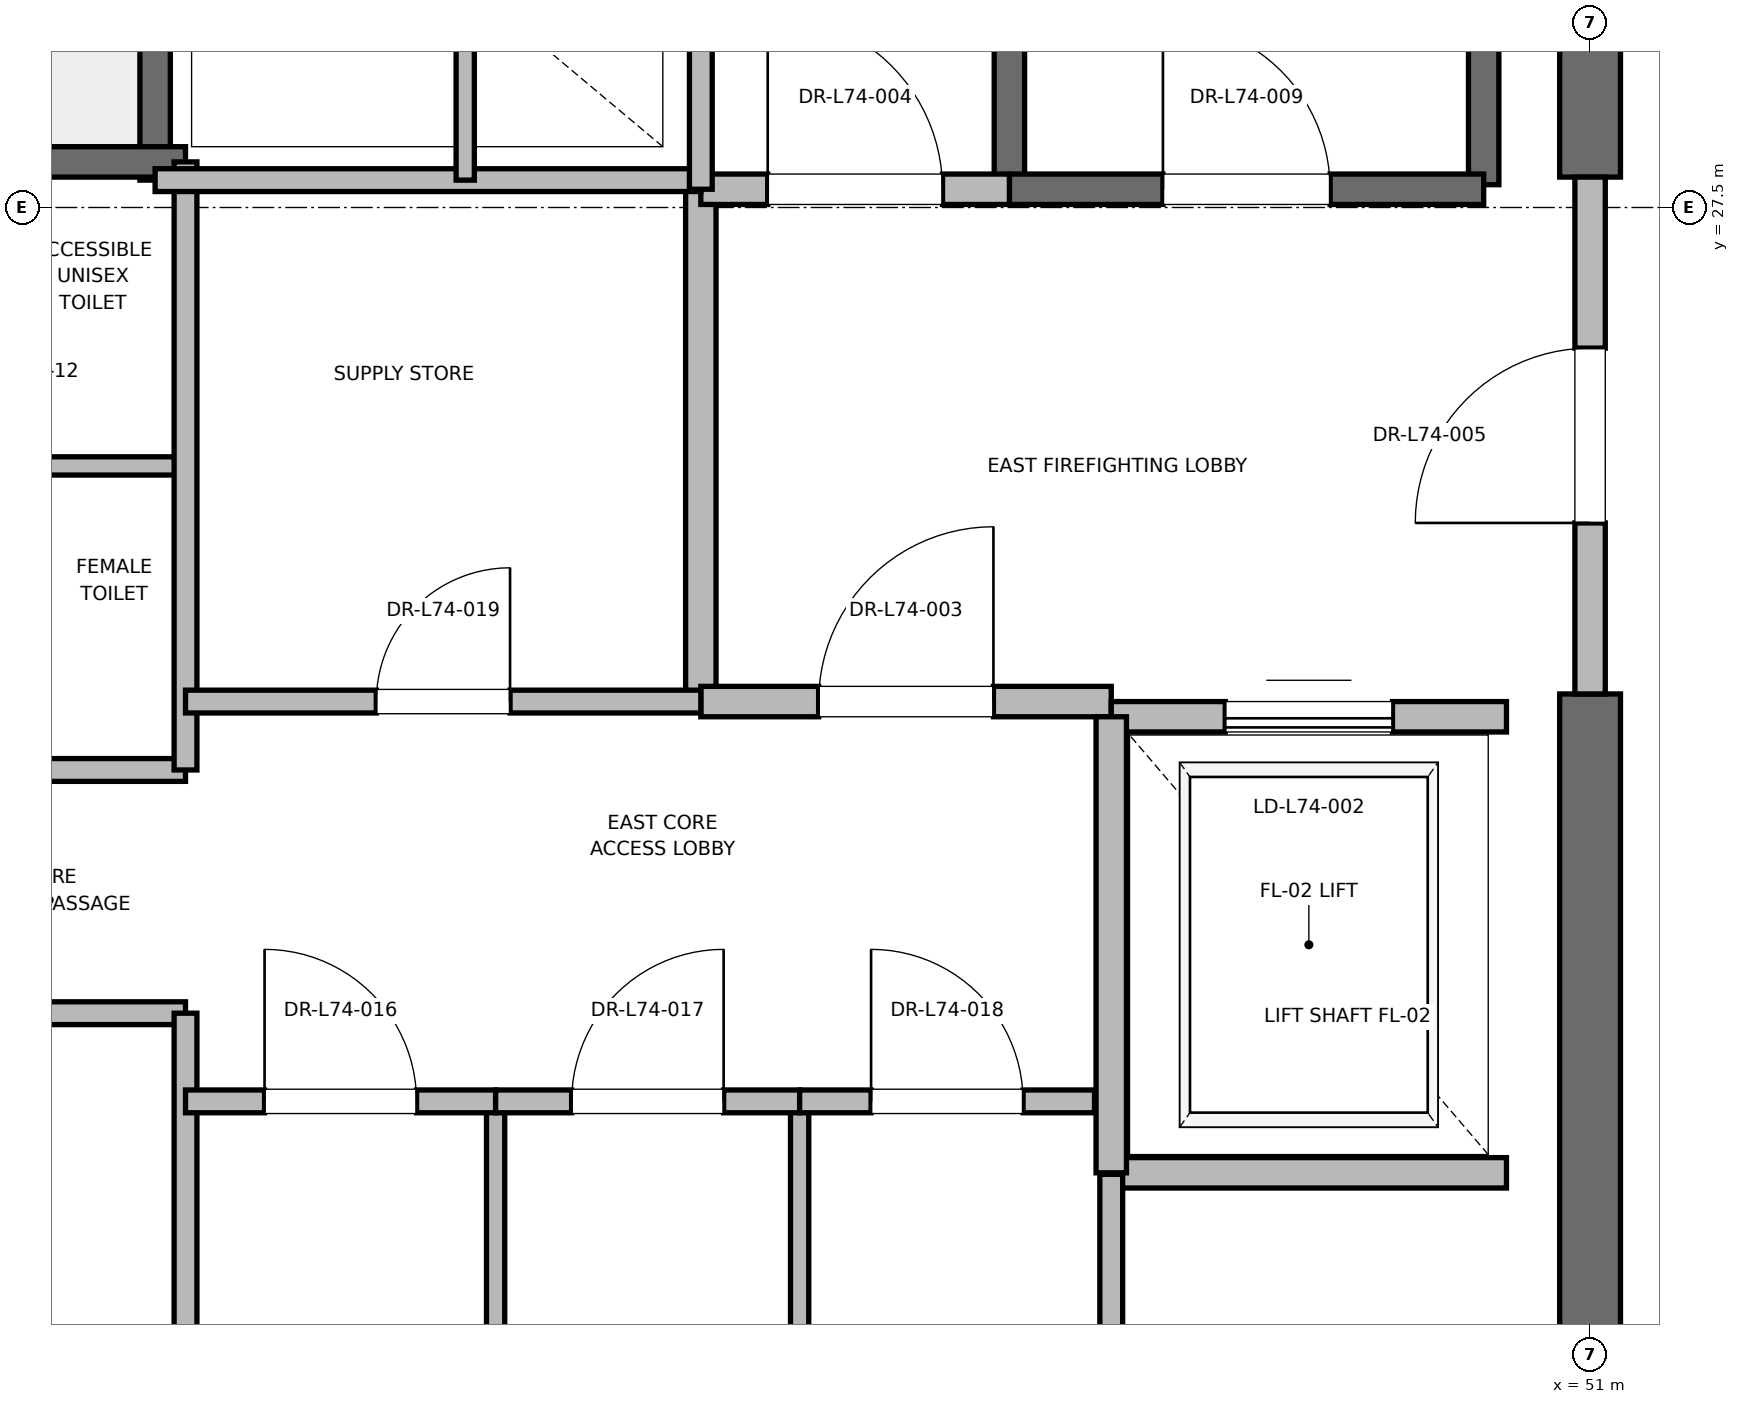
"""IFC4 building model, lengths in metres.
Left out: names, types, materials, properties, quantities, classifications, styles, units other than length and angle.
Written with IfcOpenShell. Run it as: python <this file> out.ifc"""

import sys

from ifc_helpers import new_model, si_unit, direction, frame, frame_2d, origin, place, context, subcontext, project, spatial, rectangle, extrude, element, fill, save


model = new_model("IFC4")
c1 = context("Model", 3, precision=1e-05, world=origin(), true_north=direction((0.0, 1.0)))
c2 = subcontext(c1, "Body", "Model", "MODEL_VIEW")
j1 = project(units=[si_unit("LENGTHUNIT", "METRE"), si_unit("PLANEANGLEUNIT", "RADIAN")], contexts=[c1])
p1 = place(None, origin())
s1 = spatial("IfcSite", under=j1, at=p1, CompositionType="ELEMENT")
p2 = place(p1, origin())
s2 = spatial("IfcBuilding", under=s1, at=p2, CompositionType="ELEMENT")
p3 = place(p2, frame((0.0, 0.0, 318.8)))
s3 = spatial("IfcBuildingStorey", under=s2, at=p3, CompositionType="ELEMENT", Elevation=318.8)
p4 = place(p3, frame((51.0, 18.5, 0.0), z_axis=(0.0, 0.0, 1.0), x_axis=(0.0, 1.0, 0.0)))
e1 = element("IfcWall", 1, at=p4, inside=s3, PredefinedType="SHEAR", context=c2, shape_type="SweptSolid", body=[
    extrude(rectangle(XDim=5.8, YDim=0.4, at=frame_2d((2.9, 0.0))), origin(), (0.0, 0.0, 1.0), 3.785),
])
p5 = place(p3, frame((51.0, 27.7, 0.0), z_axis=(0.0, 0.0, 1.0), x_axis=(0.0, 1.0, 0.0)))
e2 = element("IfcWall", 2, at=p5, inside=s3, PredefinedType="SHEAR", context=c2, shape_type="SweptSolid", body=[
    extrude(rectangle(XDim=8.8, YDim=0.4, at=frame_2d((4.4, 0.0))), origin(), (0.0, 0.0, 1.0), 3.785),
])
p6 = place(p3, frame((50.3, 27.65, 0.0), z_axis=(0.0, 0.0, 1.0), x_axis=(0.0, 1.0, 0.0)))
e3 = element("IfcWall", 3, at=p6, inside=s3, PredefinedType="SOLIDWALL", context=c2, shape_type="SweptSolid", body=[
    extrude(rectangle(XDim=8.15, YDim=0.2, at=frame_2d((4.075, 0.0))), origin(), (0.0, 0.0, 1.0), 3.785),
])
p7 = place(p3, frame((47.18, 27.62, 0.0), z_axis=(0.0, 0.0, 1.0), x_axis=(0.0, 1.0, 0.0)))
e4 = element("IfcWall", 4, at=p7, inside=s3, PredefinedType="SOLIDWALL", context=c2, shape_type="SweptSolid", body=[
    extrude(rectangle(XDim=8.18, YDim=0.2, at=frame_2d((4.09, 0.0))), origin(), (0.0, 0.0, 1.0), 3.785),
])
p8 = place(p3, frame((47.18, 27.62, 0.0), z_axis=(0.0, 0.0, 1.0), x_axis=(1.0, 0.0, 0.0)))
e5 = element("IfcWall", 5, at=p8, inside=s3, PredefinedType="SOLIDWALL", context=c2, shape_type="SweptSolid", body=[
    extrude(rectangle(XDim=3.12, YDim=0.2, at=frame_2d((1.56, 0.0))), origin(), (0.0, 0.0, 1.0), 3.785),
])
p9 = place(p8, frame((1.01, 0.0, 0.0)))
e6 = element("IfcOpeningElement", 6, at=p9, cuts=e5, PredefinedType="OPENING", context=c2, shape_type="SweptSolid", body=[
    extrude(rectangle(XDim=1.1, YDim=2.15, at=frame_2d((0.55, 1.075))), frame((0.0, 0.1, 0.0), z_axis=(0.0, -1.0, 0.0), x_axis=(1.0, 0.0, 0.0)), (0.0, 0.0, 1.0), 0.2),
])
p10 = place(p3, frame((41.56, 27.68, 0.0), z_axis=(0.0, 0.0, 1.0), x_axis=(0.0, 1.0, 0.0)))
e7 = element("IfcWall", 7, at=p10, inside=s3, PredefinedType="SOLIDWALL", context=c2, shape_type="SweptSolid", body=[
    extrude(rectangle(XDim=8.57, YDim=0.2, at=frame_2d((4.285, 0.0))), origin(), (0.0, 0.0, 1.0), 3.785),
])
p11 = place(p3, frame((38.44, 27.8, 0.0), z_axis=(0.0, 0.0, 1.0), x_axis=(1.0, 0.0, 0.0)))
e8 = element("IfcWall", 8, at=p11, inside=s3, PredefinedType="SOLIDWALL", context=c2, shape_type="SweptSolid", body=[
    extrude(rectangle(XDim=3.32, YDim=0.2, at=frame_2d((1.66, 0.0))), origin(), (0.0, 0.0, 1.0), 3.785),
])
p12 = place(p3, frame((45.15, 24.25, 0.0), z_axis=(0.0, 0.0, 1.0), x_axis=(0.0, 1.0, 0.0)))
e9 = element("IfcWall", 9, at=p12, inside=s3, PredefinedType="PARTITIONING", context=c2, shape_type="SweptSolid", body=[
    extrude(rectangle(XDim=3.37, YDim=0.2, at=frame_2d((1.685, 0.0))), origin(), (0.0, 0.0, 1.0), 3.785),
])
p13 = place(p3, frame((45.15, 24.25, 0.0), z_axis=(0.0, 0.0, 1.0), x_axis=(1.0, 0.0, 0.0)))
e10 = element("IfcWall", 10, at=p13, inside=s3, PredefinedType="PARTITIONING", context=c2, shape_type="SweptSolid", body=[
    extrude(rectangle(XDim=2.7, YDim=0.2, at=frame_2d((1.35, 0.0))), origin(), (0.0, 0.0, 1.0), 3.785),
])
p14 = place(p13, frame((0.775, 0.0, 0.0)))
e11 = element("IfcOpeningElement", 11, at=p14, cuts=e10, PredefinedType="OPENING", context=c2, shape_type="SweptSolid", body=[
    extrude(rectangle(XDim=1.15, YDim=2.2, at=frame_2d((0.575, 1.1))), frame((0.0, 0.1, 0.0), z_axis=(0.0, -1.0, 0.0), x_axis=(1.0, 0.0, 0.0)), (0.0, 0.0, 1.0), 0.2),
])
p15 = place(p3, frame((45.15, 27.62, 0.0), z_axis=(0.0, 0.0, 1.0), x_axis=(1.0, 0.0, 0.0)))
e12 = element("IfcWall", 12, at=p15, inside=s3, PredefinedType="PARTITIONING", context=c2, shape_type="SweptSolid", body=[
    extrude(rectangle(XDim=2.03, YDim=0.2, at=frame_2d((1.015, 0.0))), origin(), (0.0, 0.0, 1.0), 3.785),
])
p16 = place(p15, frame((0.44, 0.0, 0.0)))
e13 = element("IfcOpeningElement", 13, at=p16, cuts=e12, PredefinedType="OPENING", context=c2, shape_type="SweptSolid", body=[
    extrude(rectangle(XDim=1.15, YDim=2.2, at=frame_2d((0.575, 1.1))), frame((0.0, 0.1, 0.0), z_axis=(0.0, -1.0, 0.0), x_axis=(1.0, 0.0, 0.0)), (0.0, 0.0, 1.0), 0.2),
])
p17 = place(p3, frame((51.0, 24.3, 0.0), z_axis=(0.0, 0.0, 1.0), x_axis=(0.0, 1.0, 0.0)))
e14 = element("IfcWall", 14, at=p17, inside=s3, PredefinedType="PARTITIONING", context=c2, shape_type="SweptSolid", body=[
    extrude(rectangle(XDim=3.4, YDim=0.2, at=frame_2d((1.7, 0.0))), origin(), (0.0, 0.0, 1.0), 2.865),
])
p18 = place(p17, frame((1.125, 0.0, 0.0)))
e15 = element("IfcOpeningElement", 15, at=p18, cuts=e14, PredefinedType="OPENING", context=c2, shape_type="SweptSolid", body=[
    extrude(rectangle(XDim=1.15, YDim=2.2, at=frame_2d((0.575, 1.1))), frame((0.0, 0.1, 0.0), z_axis=(0.0, -1.0, 0.0), x_axis=(1.0, 0.0, 0.0)), (0.0, 0.0, 1.0), 0.2),
])
p19 = place(p3, frame((47.85, 21.15, 0.0), z_axis=(0.0, 0.0, 1.0), x_axis=(1.0, 0.0, 0.0)))
e16 = element("IfcWall", 16, at=p19, inside=s3, PredefinedType="SOLIDWALL", context=c2, shape_type="SweptSolid", body=[
    extrude(rectangle(XDim=2.6, YDim=0.2, at=frame_2d((1.3, 0.0))), origin(), (0.0, 0.0, 1.0), 3.785),
])
p20 = place(p3, frame((50.45, 24.15, 0.0), z_axis=(0.0, 0.0, 1.0), x_axis=(-1.0, 0.0, 0.0)))
e17 = element("IfcWall", 17, at=p20, inside=s3, PredefinedType="SOLIDWALL", context=c2, shape_type="SweptSolid", body=[
    extrude(rectangle(XDim=2.6, YDim=0.2, at=frame_2d((1.3, 0.0))), origin(), (0.0, 0.0, 1.0), 2.865),
])
p21 = place(p20, frame((0.75, 0.0, 0.0)))
e18 = element("IfcOpeningElement", 18, at=p21, cuts=e17, PredefinedType="OPENING", context=c2, shape_type="SweptSolid", body=[
    extrude(rectangle(XDim=1.1, YDim=2.2, at=frame_2d((0.55, 1.1))), frame((0.0, 0.1, 0.0), z_axis=(0.0, -1.0, 0.0), x_axis=(1.0, 0.0, 0.0)), (0.0, 0.0, 1.0), 0.2),
])
p22 = place(p3, frame((47.85, 24.15, 0.0), z_axis=(0.0, 0.0, 1.0), x_axis=(0.0, -1.0, 0.0)))
e19 = element("IfcWall", 19, at=p22, inside=s3, PredefinedType="SOLIDWALL", context=c2, shape_type="SweptSolid", body=[
    extrude(rectangle(XDim=3.0, YDim=0.2, at=frame_2d((1.5, 0.0))), origin(), (0.0, 0.0, 1.0), 3.785),
])
for number, where, z_axis, x_axis in (
    (20, (39.95, 22.2, 0.0), (0.0, 0.0, 1.0), (1.0, 0.0, 0.0)),
    (21, (39.95, 23.8, 0.0), (0.0, 0.0, 1.0), (1.0, 0.0, 0.0)),
):
    element("IfcWall", number, at=place(p3, frame(where, z_axis=z_axis, x_axis=x_axis)), inside=s3, PredefinedType="PARTITIONING", context=c2, shape_type="SweptSolid", body=[
        extrude(rectangle(XDim=1.81, YDim=0.15, at=frame_2d((0.905, 0.0))), origin(), (0.0, 0.0, 1.0), 2.85),
    ])
p23 = place(p3, frame((39.95, 25.8, 0.0), z_axis=(0.0, 0.0, 1.0), x_axis=(1.0, 0.0, 0.0)))
e22 = element("IfcWall", 22, at=p23, inside=s3, PredefinedType="PARTITIONING", context=c2, shape_type="SweptSolid", body=[
    extrude(rectangle(XDim=1.81, YDim=0.12, at=frame_2d((0.905, 0.0))), origin(), (0.0, 0.0, 1.0), 2.85),
])
p24 = place(p3, frame((41.76, 18.6, 0.0), z_axis=(0.0, 0.0, 1.0), x_axis=(0.0, 1.0, 0.0)))
e23 = element("IfcWall", 23, at=p24, inside=s3, PredefinedType="PARTITIONING", context=c2, shape_type="SweptSolid", body=[
    extrude(rectangle(XDim=3.6, YDim=0.15, at=frame_2d((1.8, 0.0))), origin(), (0.0, 0.0, 1.0), 2.85),
])
p25 = place(p3, frame((41.76, 23.8, 0.0), z_axis=(0.0, 0.0, 1.0), x_axis=(0.0, 1.0, 0.0)))
e24 = element("IfcWall", 24, at=p25, inside=s3, PredefinedType="PARTITIONING", context=c2, shape_type="SweptSolid", body=[
    extrude(rectangle(XDim=4.0, YDim=0.15, at=frame_2d((2.0, 0.0))), origin(), (0.0, 0.0, 1.0), 2.85),
])
p26 = place(p3, frame((41.56, 27.68, 0.0), z_axis=(0.0, 0.0, 1.0), x_axis=(1.0, 0.0, 0.0)))
e25 = element("IfcWall", 25, at=p26, inside=s3, PredefinedType="PARTITIONING", context=c2, shape_type="SweptSolid", body=[
    extrude(rectangle(XDim=3.59, YDim=0.15, at=frame_2d((1.795, 0.0))), origin(), (0.0, 0.0, 1.0), 2.85),
])
p27 = place(p3, frame((47.85, 18.6, 0.0), z_axis=(0.0, 0.0, 1.0), x_axis=(0.0, 1.0, 0.0)))
e26 = element("IfcWall", 26, at=p27, inside=s3, PredefinedType="PARTITIONING", context=c2, shape_type="SweptSolid", body=[
    extrude(rectangle(XDim=2.54, YDim=0.15, at=frame_2d((1.27, 0.0))), origin(), (0.0, 0.0, 1.0), 2.85),
])
for number, where, z_axis, x_axis in (
    (27, (43.8, 18.6, 0.0), (0.0, 0.0, 1.0), (0.0, 1.0, 0.0)),
    (28, (45.8, 18.6, 0.0), (0.0, 0.0, 1.0), (0.0, 1.0, 0.0)),
):
    element("IfcWall", number, at=place(p3, frame(where, z_axis=z_axis, x_axis=x_axis)), inside=s3, PredefinedType="PARTITIONING", context=c2, shape_type="SweptSolid", body=[
        extrude(rectangle(XDim=3.02, YDim=0.12, at=frame_2d((1.51, 0.0))), origin(), (0.0, 0.0, 1.0), 2.85),
    ])
p28 = place(p3, frame((41.76, 21.62, 0.0), z_axis=(0.0, 0.0, 1.0), x_axis=(1.0, 0.0, 0.0)))
e29 = element("IfcWall", 29, at=p28, inside=s3, PredefinedType="PARTITIONING", context=c2, shape_type="SweptSolid", body=[
    extrude(rectangle(XDim=2.04, YDim=0.15, at=frame_2d((1.02, 0.0))), origin(), (0.0, 0.0, 1.0), 2.85),
])
p29 = place(p28, frame((0.52, 0.0, 0.0)))
e30 = element("IfcOpeningElement", 30, at=p29, cuts=e29, PredefinedType="OPENING", context=c2, shape_type="SweptSolid", body=[
    extrude(rectangle(XDim=1.0, YDim=2.15, at=frame_2d((0.5, 1.075))), frame((0.0, 0.075, 0.0), z_axis=(0.0, -1.0, 0.0), x_axis=(1.0, 0.0, 0.0)), (0.0, 0.0, 1.0), 0.15),
])
p30 = place(p3, frame((43.8, 21.62, 0.0), z_axis=(0.0, 0.0, 1.0), x_axis=(1.0, 0.0, 0.0)))
e31 = element("IfcWall", 31, at=p30, inside=s3, PredefinedType="PARTITIONING", context=c2, shape_type="SweptSolid", body=[
    extrude(rectangle(XDim=2.0, YDim=0.15, at=frame_2d((1.0, 0.0))), origin(), (0.0, 0.0, 1.0), 2.85),
])
p31 = place(p30, frame((0.5, 0.0, 0.0)))
e32 = element("IfcOpeningElement", 32, at=p31, cuts=e31, PredefinedType="OPENING", context=c2, shape_type="SweptSolid", body=[
    extrude(rectangle(XDim=1.0, YDim=2.15, at=frame_2d((0.5, 1.075))), frame((0.0, 0.075, 0.0), z_axis=(0.0, -1.0, 0.0), x_axis=(1.0, 0.0, 0.0)), (0.0, 0.0, 1.0), 0.15),
])
p32 = place(p3, frame((45.8, 21.62, 0.0), z_axis=(0.0, 0.0, 1.0), x_axis=(1.0, 0.0, 0.0)))
e33 = element("IfcWall", 33, at=p32, inside=s3, PredefinedType="PARTITIONING", context=c2, shape_type="SweptSolid", body=[
    extrude(rectangle(XDim=1.94, YDim=0.15, at=frame_2d((0.97, 0.0))), origin(), (0.0, 0.0, 1.0), 2.85),
])
p33 = place(p32, frame((0.47, 0.0, 0.0)))
e34 = element("IfcOpeningElement", 34, at=p33, cuts=e33, PredefinedType="OPENING", context=c2, shape_type="SweptSolid", body=[
    extrude(rectangle(XDim=1.0, YDim=2.15, at=frame_2d((0.5, 1.075))), frame((0.0, 0.075, 0.0), z_axis=(0.0, -1.0, 0.0), x_axis=(1.0, 0.0, 0.0)), (0.0, 0.0, 1.0), 0.15),
])
p34 = place(p3, frame((41.76, 24.25, 0.0), z_axis=(0.0, 0.0, 1.0), x_axis=(1.0, 0.0, 0.0)))
e35 = element("IfcWall", 35, at=p34, inside=s3, PredefinedType="PARTITIONING", context=c2, shape_type="SweptSolid", body=[
    extrude(rectangle(XDim=3.39, YDim=0.15, at=frame_2d((1.695, 0.0))), origin(), (0.0, 0.0, 1.0), 2.85),
])
p35 = place(p34, frame((1.255, 0.0, 0.0)))
e36 = element("IfcOpeningElement", 36, at=p35, cuts=e35, PredefinedType="OPENING", context=c2, shape_type="SweptSolid", body=[
    extrude(rectangle(XDim=0.88, YDim=2.1, at=frame_2d((0.44, 1.05))), frame((0.0, 0.075, 0.0), z_axis=(0.0, -1.0, 0.0), x_axis=(1.0, 0.0, 0.0)), (0.0, 0.0, 1.0), 0.15),
])
p36 = place(p3, frame((45.15, 27.62, 0.0), z_axis=(0.0, 0.0, 1.0), x_axis=(0.0, 1.0, 0.0)))
e37 = element("IfcWall", 37, at=p36, inside=s3, PredefinedType="PARTITIONING", context=c2, shape_type="SweptSolid", body=[
    extrude(rectangle(XDim=3.1, YDim=0.15, at=frame_2d((1.55, 0.0))), origin(), (0.0, 0.0, 1.0), 2.85),
])
p37 = place(p3, frame((43.6, 27.68, 0.0), z_axis=(0.0, 0.0, 1.0), x_axis=(0.0, 1.0, 0.0)))
e38 = element("IfcWall", 38, at=p37, inside=s3, PredefinedType="PARTITIONING", context=c2, shape_type="SweptSolid", body=[
    extrude(rectangle(XDim=3.04, YDim=0.12, at=frame_2d((1.52, 0.0))), origin(), (0.0, 0.0, 1.0), 2.85),
])
p38 = place(p9, origin())
e39 = element("IfcDoor", 39, at=p38, inside=s3, OperationType="SINGLE_SWING_LEFT", PredefinedType="DOOR", context=c2, shape_type="SweptSolid", body=[
    extrude(rectangle(XDim=1.1, YDim=2.15, at=frame_2d((0.55, 1.075))), frame((0.0, 0.025, 0.0), z_axis=(0.0, -1.0, 0.0), x_axis=(1.0, 0.0, 0.0)), (0.0, 0.0, 1.0), 0.05),
])
fill(e6, e39)
p39 = place(p14, origin())
e40 = element("IfcDoor", 40, at=p39, inside=s3, OperationType="SINGLE_SWING_RIGHT", PredefinedType="DOOR", context=c2, shape_type="SweptSolid", body=[
    extrude(rectangle(XDim=1.15, YDim=2.2, at=frame_2d((0.575, 1.1))), frame((0.0, 0.025, 0.0), z_axis=(0.0, -1.0, 0.0), x_axis=(1.0, 0.0, 0.0)), (0.0, 0.0, 1.0), 0.05),
])
fill(e11, e40)
p40 = place(p16, origin())
e41 = element("IfcDoor", 41, at=p40, inside=s3, OperationType="SINGLE_SWING_LEFT", PredefinedType="DOOR", context=c2, shape_type="SweptSolid", body=[
    extrude(rectangle(XDim=1.15, YDim=2.2, at=frame_2d((0.575, 1.1))), frame((0.0, 0.025, 0.0), z_axis=(0.0, -1.0, 0.0), x_axis=(1.0, 0.0, 0.0)), (0.0, 0.0, 1.0), 0.05),
])
fill(e13, e41)
p41 = place(p18, origin())
e42 = element("IfcDoor", 42, at=p41, inside=s3, OperationType="SINGLE_SWING_LEFT", PredefinedType="DOOR", context=c2, shape_type="SweptSolid", body=[
    extrude(rectangle(XDim=1.15, YDim=2.2, at=frame_2d((0.575, 1.1))), frame((0.0, 0.025, 0.0), z_axis=(0.0, -1.0, 0.0), x_axis=(1.0, 0.0, 0.0)), (0.0, 0.0, 1.0), 0.05),
])
fill(e15, e42)
p42 = place(p21, origin())
e43 = element("IfcDoor", 43, at=p42, inside=s3, OperationType="SLIDING_TO_RIGHT", PredefinedType="DOOR", context=c2, shape_type="SweptSolid", body=[
    extrude(rectangle(XDim=1.1, YDim=2.2, at=frame_2d((0.55, 1.1))), frame((0.0, 0.025, 0.0), z_axis=(0.0, -1.0, 0.0), x_axis=(1.0, 0.0, 0.0)), (0.0, 0.0, 1.0), 0.05),
])
fill(e18, e43)
p43 = place(p29, origin())
e44 = element("IfcDoor", 44, at=p43, inside=s3, OperationType="SINGLE_SWING_LEFT", PredefinedType="DOOR", context=c2, shape_type="SweptSolid", body=[
    extrude(rectangle(XDim=1.0, YDim=2.15, at=frame_2d((0.5, 1.075))), frame((0.0, 0.025, 0.0), z_axis=(0.0, -1.0, 0.0), x_axis=(1.0, 0.0, 0.0)), (0.0, 0.0, 1.0), 0.05),
])
fill(e30, e44)
p44 = place(p31, origin())
e45 = element("IfcDoor", 45, at=p44, inside=s3, OperationType="SINGLE_SWING_RIGHT", PredefinedType="DOOR", context=c2, shape_type="SweptSolid", body=[
    extrude(rectangle(XDim=1.0, YDim=2.15, at=frame_2d((0.5, 1.075))), frame((0.0, 0.025, 0.0), z_axis=(0.0, -1.0, 0.0), x_axis=(1.0, 0.0, 0.0)), (0.0, 0.0, 1.0), 0.05),
])
fill(e32, e45)
p45 = place(p33, origin())
e46 = element("IfcDoor", 46, at=p45, inside=s3, OperationType="SINGLE_SWING_LEFT", PredefinedType="DOOR", context=c2, shape_type="SweptSolid", body=[
    extrude(rectangle(XDim=1.0, YDim=2.15, at=frame_2d((0.5, 1.075))), frame((0.0, 0.025, 0.0), z_axis=(0.0, -1.0, 0.0), x_axis=(1.0, 0.0, 0.0)), (0.0, 0.0, 1.0), 0.05),
])
fill(e34, e46)
p46 = place(p35, origin())
e47 = element("IfcDoor", 47, at=p46, inside=s3, OperationType="SINGLE_SWING_RIGHT", PredefinedType="DOOR", context=c2, shape_type="SweptSolid", body=[
    extrude(rectangle(XDim=0.88, YDim=2.1, at=frame_2d((0.44, 1.05))), frame((0.0, 0.025, 0.0), z_axis=(0.0, -1.0, 0.0), x_axis=(1.0, 0.0, 0.0)), (0.0, 0.0, 1.0), 0.05),
])
fill(e36, e47)
save(model, sys.argv[1])
